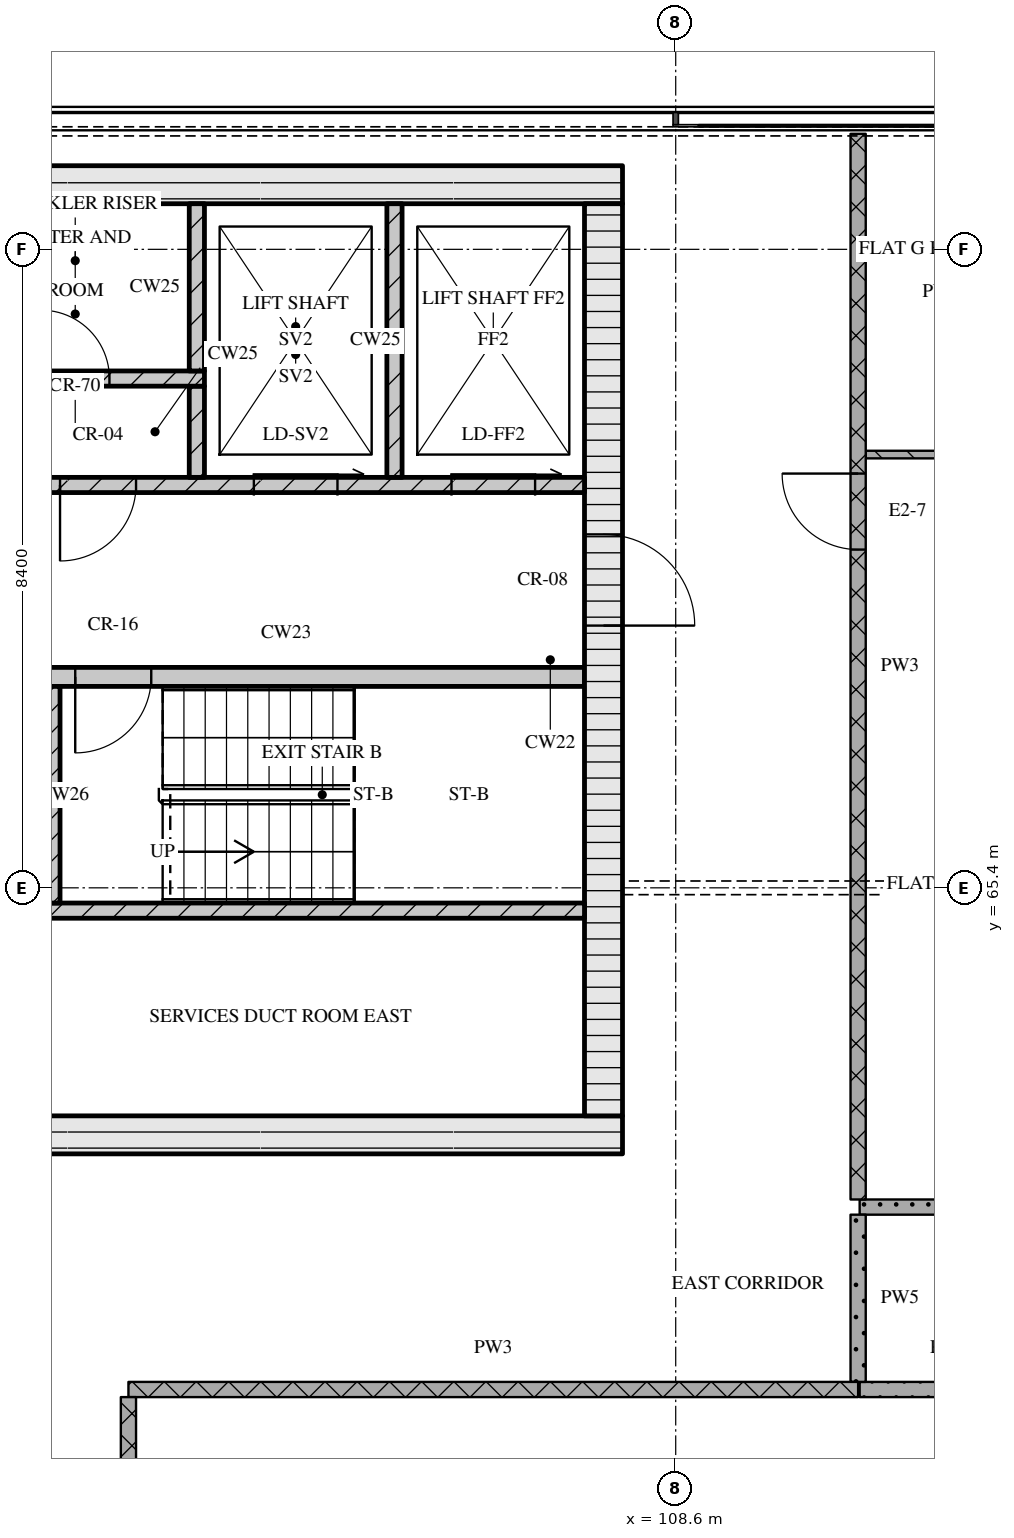
"""IFC4 building model, lengths in metres.
Left out: names, types, materials, properties, quantities, classifications, styles, units other than length and angle.
Written with IfcOpenShell. Run it as: python <this file> out.ifc"""

import sys

from ifc_helpers import new_model, si_unit, direction, frame, frame_2d, origin, place, context, subcontext, project, spatial, rectangle, extrude, element, fill, save


model = new_model("IFC4")
c1 = context("Model", 3, precision=1e-05, world=origin(), true_north=direction((0.0, 1.0)))
c2 = subcontext(c1, "Body", "Model", "MODEL_VIEW")
j1 = project(units=[si_unit("LENGTHUNIT", "METRE"), si_unit("PLANEANGLEUNIT", "RADIAN")], contexts=[c1])
p1 = place(None, origin())
s1 = spatial("IfcSite", under=j1, at=p1, CompositionType="ELEMENT")
p2 = place(p1, origin())
s2 = spatial("IfcBuilding", under=s1, at=p2, CompositionType="ELEMENT")
p3 = place(p2, frame((0.0, 0.0, 270.75)))
s3 = spatial("IfcBuildingStorey", under=s2, at=p3, CompositionType="ELEMENT", Elevation=270.75)
p4 = place(p3, frame((67.3, 62.15, 0.0), z_axis=(0.0, 0.0, 1.0), x_axis=(1.0, 0.0, 0.0)))
e1 = element("IfcWall", 1, at=p4, inside=s3, PredefinedType="SOLIDWALL", context=c2, shape_type="SweptSolid", body=[
    extrude(rectangle(XDim=40.6, YDim=0.5, at=frame_2d((20.3, 0.0))), origin(), (0.0, 0.0, 1.0), 3.32),
])
p5 = place(p4, frame((20.65, 0.0, 0.0)))
e2 = element("IfcOpeningElement", 2, at=p5, cuts=e1, PredefinedType="OPENING", context=c2, shape_type="SweptSolid", body=[
    extrude(rectangle(XDim=1.8, YDim=2.1, at=frame_2d((0.9, 1.05))), frame((0.0, 0.26, 0.0), z_axis=(0.0, -1.0, 0.0), x_axis=(1.0, 0.0, 0.0)), (0.0, 0.0, 1.0), 0.52),
])
p6 = place(p3, frame((67.3, 74.65, 0.0), z_axis=(0.0, 0.0, 1.0), x_axis=(1.0, 0.0, 0.0)))
e3 = element("IfcWall", 3, at=p6, inside=s3, PredefinedType="SOLIDWALL", context=c2, shape_type="SweptSolid", body=[
    extrude(rectangle(XDim=40.6, YDim=0.5, at=frame_2d((20.3, 0.0))), origin(), (0.0, 0.0, 1.0), 3.32),
])
p7 = place(p3, frame((107.65, 62.4, 0.0), z_axis=(0.0, 0.0, 1.0), x_axis=(0.0, 1.0, 0.0)))
e4 = element("IfcWall", 4, at=p7, inside=s3, PredefinedType="SOLIDWALL", context=c2, shape_type="SweptSolid", body=[
    extrude(rectangle(XDim=12.0, YDim=0.5, at=frame_2d((6.0, 0.0))), origin(), (0.0, 0.0, 1.0), 3.32),
])
p8 = place(p7, frame((6.45, 0.0, 0.0)))
e5 = element("IfcOpeningElement", 5, at=p8, cuts=e4, PredefinedType="OPENING", context=c2, shape_type="SweptSolid", body=[
    extrude(rectangle(XDim=1.2, YDim=2.1, at=frame_2d((0.6, 1.05))), frame((0.0, 0.26, 0.0), z_axis=(0.0, -1.0, 0.0), x_axis=(1.0, 0.0, 0.0)), (0.0, 0.0, 1.0), 0.52),
])
p9 = place(p3, frame((91.4, 65.1, 0.0), z_axis=(0.0, 0.0, 1.0), x_axis=(1.0, 0.0, 0.0)))
e6 = element("IfcWall", 6, at=p9, inside=s3, PredefinedType="SOLIDWALL", context=c2, shape_type="SweptSolid", body=[
    extrude(rectangle(XDim=16.0, YDim=0.2, at=frame_2d((8.0, 0.0))), origin(), (0.0, 0.0, 1.0), 3.32),
])
p10 = place(p9, frame((0.85, 0.0, 0.0)))
e7 = element("IfcOpeningElement", 7, at=p10, cuts=e6, PredefinedType="OPENING", context=c2, shape_type="SweptSolid", body=[
    extrude(rectangle(XDim=1.1, YDim=2.1, at=frame_2d((0.55, 1.05))), frame((0.0, 0.11, 0.0), z_axis=(0.0, -1.0, 0.0), x_axis=(1.0, 0.0, 0.0)), (0.0, 0.0, 1.0), 0.22),
])
p11 = place(p9, frame((3.35, 0.0, 0.0)))
e8 = element("IfcOpeningElement", 8, at=p11, cuts=e6, PredefinedType="OPENING", context=c2, shape_type="SweptSolid", body=[
    extrude(rectangle(XDim=1.1, YDim=2.1, at=frame_2d((0.55, 1.05))), frame((0.0, 0.11, 0.0), z_axis=(0.0, -1.0, 0.0), x_axis=(1.0, 0.0, 0.0)), (0.0, 0.0, 1.0), 0.22),
])
p12 = place(p9, frame((5.85, 0.0, 0.0)))
e9 = element("IfcOpeningElement", 9, at=p12, cuts=e6, PredefinedType="OPENING", context=c2, shape_type="SweptSolid", body=[
    extrude(rectangle(XDim=1.1, YDim=2.1, at=frame_2d((0.55, 1.05))), frame((0.0, 0.11, 0.0), z_axis=(0.0, -1.0, 0.0), x_axis=(1.0, 0.0, 0.0)), (0.0, 0.0, 1.0), 0.22),
])
p13 = place(p9, frame((7.83, 0.0, 0.0)))
e10 = element("IfcOpeningElement", 10, at=p13, cuts=e6, PredefinedType="OPENING", context=c2, shape_type="SweptSolid", body=[
    extrude(rectangle(XDim=0.9, YDim=2.1, at=frame_2d((0.45, 1.05))), frame((0.0, 0.11, 0.0), z_axis=(0.0, -1.0, 0.0), x_axis=(1.0, 0.0, 0.0)), (0.0, 0.0, 1.0), 0.22),
])
p14 = place(p3, frame((100.35, 65.2, 0.0), z_axis=(0.0, 0.0, 1.0), x_axis=(0.0, 1.0, 0.0)))
e11 = element("IfcWall", 11, at=p14, inside=s3, PredefinedType="SOLIDWALL", context=c2, shape_type="SweptSolid", body=[
    extrude(rectangle(XDim=2.85, YDim=0.3, at=frame_2d((1.425, 0.0))), origin(), (0.0, 0.0, 1.0), 3.32),
])
p15 = place(p3, frame((98.95, 68.175, 0.0), z_axis=(0.0, 0.0, 1.0), x_axis=(1.0, 0.0, 0.0)))
e12 = element("IfcWall", 12, at=p15, inside=s3, PredefinedType="SOLIDWALL", context=c2, shape_type="SweptSolid", body=[
    extrude(rectangle(XDim=8.45, YDim=0.25, at=frame_2d((4.225, 0.0))), origin(), (0.0, 0.0, 1.0), 3.32),
])
p16 = place(p15, frame((0.45, 0.0, 0.0)))
e13 = element("IfcOpeningElement", 13, at=p16, cuts=e12, PredefinedType="OPENING", context=c2, shape_type="SweptSolid", body=[
    extrude(rectangle(XDim=0.8, YDim=2.1, at=frame_2d((0.4, 1.05))), frame((0.0, 0.135, 0.0), z_axis=(0.0, -1.0, 0.0), x_axis=(1.0, 0.0, 0.0)), (0.0, 0.0, 1.0), 0.27),
])
p17 = place(p15, frame((1.75, 0.0, 0.0)))
e14 = element("IfcOpeningElement", 14, at=p17, cuts=e12, PredefinedType="OPENING", context=c2, shape_type="SweptSolid", body=[
    extrude(rectangle(XDim=1.0, YDim=2.1, at=frame_2d((0.5, 1.05))), frame((0.0, 0.135, 0.0), z_axis=(0.0, -1.0, 0.0), x_axis=(1.0, 0.0, 0.0)), (0.0, 0.0, 1.0), 0.27),
])
p18 = place(p3, frame((67.8, 70.7, 0.0), z_axis=(0.0, 0.0, 1.0), x_axis=(1.0, 0.0, 0.0)))
e15 = element("IfcWall", 15, at=p18, inside=s3, PredefinedType="SOLIDWALL", context=c2, shape_type="SweptSolid", body=[
    extrude(rectangle(XDim=39.6, YDim=0.2, at=frame_2d((19.8, 0.0))), origin(), (0.0, 0.0, 1.0), 3.32),
])
p19 = place(p18, frame((0.65, 0.0, 0.0)))
e16 = element("IfcOpeningElement", 16, at=p19, cuts=e15, PredefinedType="OPENING", context=c2, shape_type="SweptSolid", body=[
    extrude(rectangle(XDim=1.1, YDim=2.1, at=frame_2d((0.55, 1.05))), frame((0.0, 0.11, 0.0), z_axis=(0.0, -1.0, 0.0), x_axis=(1.0, 0.0, 0.0)), (0.0, 0.0, 1.0), 0.22),
])
p20 = place(p18, frame((3.25, 0.0, 0.0)))
e17 = element("IfcOpeningElement", 17, at=p20, cuts=e15, PredefinedType="OPENING", context=c2, shape_type="SweptSolid", body=[
    extrude(rectangle(XDim=1.1, YDim=2.1, at=frame_2d((0.55, 1.05))), frame((0.0, 0.11, 0.0), z_axis=(0.0, -1.0, 0.0), x_axis=(1.0, 0.0, 0.0)), (0.0, 0.0, 1.0), 0.22),
])
p21 = place(p18, frame((5.9, 0.0, 0.0)))
e18 = element("IfcOpeningElement", 18, at=p21, cuts=e15, PredefinedType="OPENING", context=c2, shape_type="SweptSolid", body=[
    extrude(rectangle(XDim=1.0, YDim=2.1, at=frame_2d((0.5, 1.05))), frame((0.0, 0.11, 0.0), z_axis=(0.0, -1.0, 0.0), x_axis=(1.0, 0.0, 0.0)), (0.0, 0.0, 1.0), 0.22),
])
p22 = place(p18, frame((21.7, 0.0, 0.0)))
e19 = element("IfcOpeningElement", 19, at=p22, cuts=e15, PredefinedType="OPENING", context=c2, shape_type="SweptSolid", body=[
    extrude(rectangle(XDim=1.0, YDim=2.1, at=frame_2d((0.5, 1.05))), frame((0.0, 0.11, 0.0), z_axis=(0.0, -1.0, 0.0), x_axis=(1.0, 0.0, 0.0)), (0.0, 0.0, 1.0), 0.22),
])
p23 = place(p18, frame((32.7, 0.0, 0.0)))
e20 = element("IfcOpeningElement", 20, at=p23, cuts=e15, PredefinedType="OPENING", context=c2, shape_type="SweptSolid", body=[
    extrude(rectangle(XDim=1.0, YDim=2.1, at=frame_2d((0.5, 1.05))), frame((0.0, 0.11, 0.0), z_axis=(0.0, -1.0, 0.0), x_axis=(1.0, 0.0, 0.0)), (0.0, 0.0, 1.0), 0.22),
])
p24 = place(p18, frame((35.25, 0.0, 0.0)))
e21 = element("IfcOpeningElement", 21, at=p24, cuts=e15, PredefinedType="OPENING", context=c2, shape_type="SweptSolid", body=[
    extrude(rectangle(XDim=1.1, YDim=2.1, at=frame_2d((0.55, 1.05))), frame((0.0, 0.11, 0.0), z_axis=(0.0, -1.0, 0.0), x_axis=(1.0, 0.0, 0.0)), (0.0, 0.0, 1.0), 0.22),
])
p25 = place(p18, frame((37.85, 0.0, 0.0)))
e22 = element("IfcOpeningElement", 22, at=p25, cuts=e15, PredefinedType="OPENING", context=c2, shape_type="SweptSolid", body=[
    extrude(rectangle(XDim=1.1, YDim=2.1, at=frame_2d((0.55, 1.05))), frame((0.0, 0.11, 0.0), z_axis=(0.0, -1.0, 0.0), x_axis=(1.0, 0.0, 0.0)), (0.0, 0.0, 1.0), 0.22),
])
p26 = place(p3, frame((102.3, 70.8, 0.0), z_axis=(0.0, 0.0, 1.0), x_axis=(0.0, 1.0, 0.0)))
e23 = element("IfcWall", 23, at=p26, inside=s3, PredefinedType="SOLIDWALL", context=c2, shape_type="SweptSolid", body=[
    extrude(rectangle(XDim=1.2, YDim=0.2, at=frame_2d((0.6, 0.0))), origin(), (0.0, 0.0, 1.0), 3.32),
])
p27 = place(p3, frame((104.9, 70.8, 0.0), z_axis=(0.0, 0.0, 1.0), x_axis=(0.0, 1.0, 0.0)))
e24 = element("IfcWall", 24, at=p27, inside=s3, PredefinedType="SOLIDWALL", context=c2, shape_type="SweptSolid", body=[
    extrude(rectangle(XDim=3.6, YDim=0.2, at=frame_2d((1.8, 0.0))), origin(), (0.0, 0.0, 1.0), 3.32),
])
p28 = place(p3, frame((90.7, 72.1, 0.0), z_axis=(0.0, 0.0, 1.0), x_axis=(1.0, 0.0, 0.0)))
e25 = element("IfcWall", 25, at=p28, inside=s3, PredefinedType="SOLIDWALL", context=c2, shape_type="SweptSolid", body=[
    extrude(rectangle(XDim=11.7, YDim=0.2, at=frame_2d((5.85, 0.0))), origin(), (0.0, 0.0, 1.0), 3.32),
])
p29 = place(p28, frame((1.6, 0.0, 0.0)))
e26 = element("IfcOpeningElement", 26, at=p29, cuts=e25, PredefinedType="OPENING", context=c2, shape_type="SweptSolid", body=[
    extrude(rectangle(XDim=0.9, YDim=2.1, at=frame_2d((0.45, 1.05))), frame((0.0, 0.11, 0.0), z_axis=(0.0, -1.0, 0.0), x_axis=(1.0, 0.0, 0.0)), (0.0, 0.0, 1.0), 0.22),
])
p30 = place(p28, frame((5.335, 0.0, 0.0)))
e27 = element("IfcOpeningElement", 27, at=p30, cuts=e25, PredefinedType="OPENING", context=c2, shape_type="SweptSolid", body=[
    extrude(rectangle(XDim=0.9, YDim=2.1, at=frame_2d((0.45, 1.05))), frame((0.0, 0.11, 0.0), z_axis=(0.0, -1.0, 0.0), x_axis=(1.0, 0.0, 0.0)), (0.0, 0.0, 1.0), 0.22),
])
p31 = place(p28, frame((9.55, 0.0, 0.0)))
e28 = element("IfcOpeningElement", 28, at=p31, cuts=e25, PredefinedType="OPENING", context=c2, shape_type="SweptSolid", body=[
    extrude(rectangle(XDim=0.9, YDim=2.1, at=frame_2d((0.45, 1.05))), frame((0.0, 0.11, 0.0), z_axis=(0.0, -1.0, 0.0), x_axis=(1.0, 0.0, 0.0)), (0.0, 0.0, 1.0), 0.22),
])
p32 = place(p3, frame((102.3, 72.2, 0.0), z_axis=(0.0, 0.0, 1.0), x_axis=(0.0, 1.0, 0.0)))
e29 = element("IfcWall", 29, at=p32, inside=s3, PredefinedType="SOLIDWALL", context=c2, shape_type="SweptSolid", body=[
    extrude(rectangle(XDim=2.2, YDim=0.2, at=frame_2d((1.1, 0.0))), origin(), (0.0, 0.0, 1.0), 3.32),
])
p33 = place(p3, frame((101.4, 58.8, 0.0), z_axis=(0.0, 0.0, 1.0), x_axis=(1.0, 0.0, 0.0)))
e30 = element("IfcWall", 30, at=p33, inside=s3, PredefinedType="PARTITIONING", context=c2, shape_type="SweptSolid", body=[
    extrude(rectangle(XDim=9.6, YDim=0.2, at=frame_2d((4.8, 0.0))), origin(), (0.0, 0.0, 1.0), 3.32),
])
p34 = place(p3, frame((111.02, 58.8, 0.0), z_axis=(0.0, 0.0, 1.0), x_axis=(1.0, 0.0, 0.0)))
e31 = element("IfcWall", 31, at=p34, inside=s3, PredefinedType="PARTITIONING", context=c2, shape_type="SweptSolid", body=[
    extrude(rectangle(XDim=2.36, YDim=0.2, at=frame_2d((1.18, 0.0))), origin(), (0.0, 0.0, 1.0), 3.32),
])
p35 = place(p3, frame((111.02, 61.2, 0.0), z_axis=(0.0, 0.0, 1.0), x_axis=(1.0, 0.0, 0.0)))
e32 = element("IfcWall", 32, at=p35, inside=s3, PredefinedType="PARTITIONING", context=c2, shape_type="SweptSolid", body=[
    extrude(rectangle(XDim=2.66, YDim=0.2, at=frame_2d((1.33, 0.0))), origin(), (0.0, 0.0, 1.0), 3.32),
])
p36 = place(p3, frame((111.1, 71.1, 0.0), z_axis=(0.0, 0.0, 1.0), x_axis=(1.0, 0.0, 0.0)))
e33 = element("IfcWall", 33, at=p36, inside=s3, PredefinedType="PARTITIONING", context=c2, shape_type="SweptSolid", body=[
    extrude(rectangle(XDim=2.6, YDim=0.1, at=frame_2d((1.3, 0.0))), origin(), (0.0, 0.0, 1.0), 3.32),
])
p37 = place(p3, frame((101.4, 58.7, 0.0), z_axis=(0.0, 0.0, 1.0), x_axis=(0.0, -1.0, 0.0)))
e34 = element("IfcWall", 34, at=p37, inside=s3, PredefinedType="PARTITIONING", context=c2, shape_type="SweptSolid", body=[
    extrude(rectangle(XDim=8.0, YDim=0.2, at=frame_2d((4.0, 0.0))), origin(), (0.0, 0.0, 1.0), 3.32),
])
p38 = place(p37, frame((2.85, 0.0, 0.0)))
e35 = element("IfcOpeningElement", 35, at=p38, cuts=e34, PredefinedType="OPENING", context=c2, shape_type="SweptSolid", body=[
    extrude(rectangle(XDim=1.0, YDim=2.1, at=frame_2d((0.5, 1.05))), frame((0.0, 0.11, 0.0), z_axis=(0.0, -1.0, 0.0), x_axis=(1.0, 0.0, 0.0)), (0.0, 0.0, 1.0), 0.22),
])
p39 = place(p3, frame((111.0, 75.32, 0.0), z_axis=(0.0, 0.0, 1.0), x_axis=(0.0, -1.0, 0.0)))
e36 = element("IfcWall", 36, at=p39, inside=s3, PredefinedType="PARTITIONING", context=c2, shape_type="SweptSolid", body=[
    extrude(rectangle(XDim=14.02, YDim=0.2, at=frame_2d((7.01, 0.0))), origin(), (0.0, 0.0, 1.0), 3.32),
])
p40 = place(p39, frame((4.47, 0.0, 0.0)))
e37 = element("IfcOpeningElement", 37, at=p40, cuts=e36, PredefinedType="OPENING", context=c2, shape_type="SweptSolid", body=[
    extrude(rectangle(XDim=1.0, YDim=2.1, at=frame_2d((0.5, 1.05))), frame((0.0, 0.11, 0.0), z_axis=(0.0, -1.0, 0.0), x_axis=(1.0, 0.0, 0.0)), (0.0, 0.0, 1.0), 0.22),
])
p41 = place(p3, frame((111.0, 61.1, 0.0), z_axis=(0.0, 0.0, 1.0), x_axis=(0.0, -1.0, 0.0)))
e38 = element("IfcWall", 38, at=p41, inside=s3, PredefinedType="PARTITIONING", context=c2, shape_type="SweptSolid", body=[
    extrude(rectangle(XDim=2.2, YDim=0.2, at=frame_2d((1.1, 0.0))), origin(), (0.0, 0.0, 1.0), 3.32),
])
p42 = place(p17, origin())
e39 = element("IfcDoor", 39, at=p42, inside=s3, OperationType="SINGLE_SWING_RIGHT", PredefinedType="DOOR", context=c2, shape_type="SweptSolid", body=[
    extrude(rectangle(XDim=1.0, YDim=2.1, at=frame_2d((0.5, 1.05))), frame((0.0, 0.025, 0.0), z_axis=(0.0, -1.0, 0.0), x_axis=(1.0, 0.0, 0.0)), (0.0, 0.0, 1.0), 0.05),
])
fill(e14, e39)
p43 = place(p8, origin())
e40 = element("IfcDoor", 40, at=p43, inside=s3, OperationType="SINGLE_SWING_RIGHT", PredefinedType="DOOR", context=c2, shape_type="SweptSolid", body=[
    extrude(rectangle(XDim=1.2, YDim=2.1, at=frame_2d((0.6, 1.05))), frame((0.0, 0.025, 0.0), z_axis=(0.0, -1.0, 0.0), x_axis=(1.0, 0.0, 0.0)), (0.0, 0.0, 1.0), 0.05),
])
fill(e5, e40)
p44 = place(p23, origin())
e41 = element("IfcDoor", 41, at=p44, inside=s3, OperationType="SINGLE_SWING_RIGHT", PredefinedType="DOOR", context=c2, shape_type="SweptSolid", body=[
    extrude(rectangle(XDim=1.0, YDim=2.1, at=frame_2d((0.5, 1.05))), frame((0.0, 0.025, 0.0), z_axis=(0.0, -1.0, 0.0), x_axis=(1.0, 0.0, 0.0)), (0.0, 0.0, 1.0), 0.05),
])
fill(e20, e41)
p45 = place(p24, origin())
e42 = element("IfcDoor", 42, at=p45, inside=s3, OperationType="SLIDING_TO_RIGHT", PredefinedType="DOOR", context=c2, shape_type="SweptSolid", body=[
    extrude(rectangle(XDim=1.1, YDim=2.1, at=frame_2d((0.55, 1.05))), frame((0.0, 0.025, 0.0), z_axis=(0.0, -1.0, 0.0), x_axis=(1.0, 0.0, 0.0)), (0.0, 0.0, 1.0), 0.05),
])
fill(e21, e42)
p46 = place(p25, origin())
e43 = element("IfcDoor", 43, at=p46, inside=s3, OperationType="SLIDING_TO_RIGHT", PredefinedType="DOOR", context=c2, shape_type="SweptSolid", body=[
    extrude(rectangle(XDim=1.1, YDim=2.1, at=frame_2d((0.55, 1.05))), frame((0.0, 0.025, 0.0), z_axis=(0.0, -1.0, 0.0), x_axis=(1.0, 0.0, 0.0)), (0.0, 0.0, 1.0), 0.05),
])
fill(e22, e43)
p47 = place(p31, origin())
e44 = element("IfcDoor", 44, at=p47, inside=s3, OperationType="SINGLE_SWING_LEFT", PredefinedType="DOOR", context=c2, shape_type="SweptSolid", body=[
    extrude(rectangle(XDim=0.9, YDim=2.1, at=frame_2d((0.45, 1.05))), frame((0.0, 0.025, 0.0), z_axis=(0.0, -1.0, 0.0), x_axis=(1.0, 0.0, 0.0)), (0.0, 0.0, 1.0), 0.05),
])
fill(e28, e44)
p48 = place(p40, origin())
e45 = element("IfcDoor", 45, at=p48, inside=s3, OperationType="SINGLE_SWING_RIGHT", PredefinedType="DOOR", context=c2, shape_type="SweptSolid", body=[
    extrude(rectangle(XDim=1.0, YDim=2.1, at=frame_2d((0.5, 1.05))), frame((0.0, 0.025, 0.0), z_axis=(0.0, -1.0, 0.0), x_axis=(1.0, 0.0, 0.0)), (0.0, 0.0, 1.0), 0.05),
])
fill(e37, e45)
save(model, sys.argv[1])
